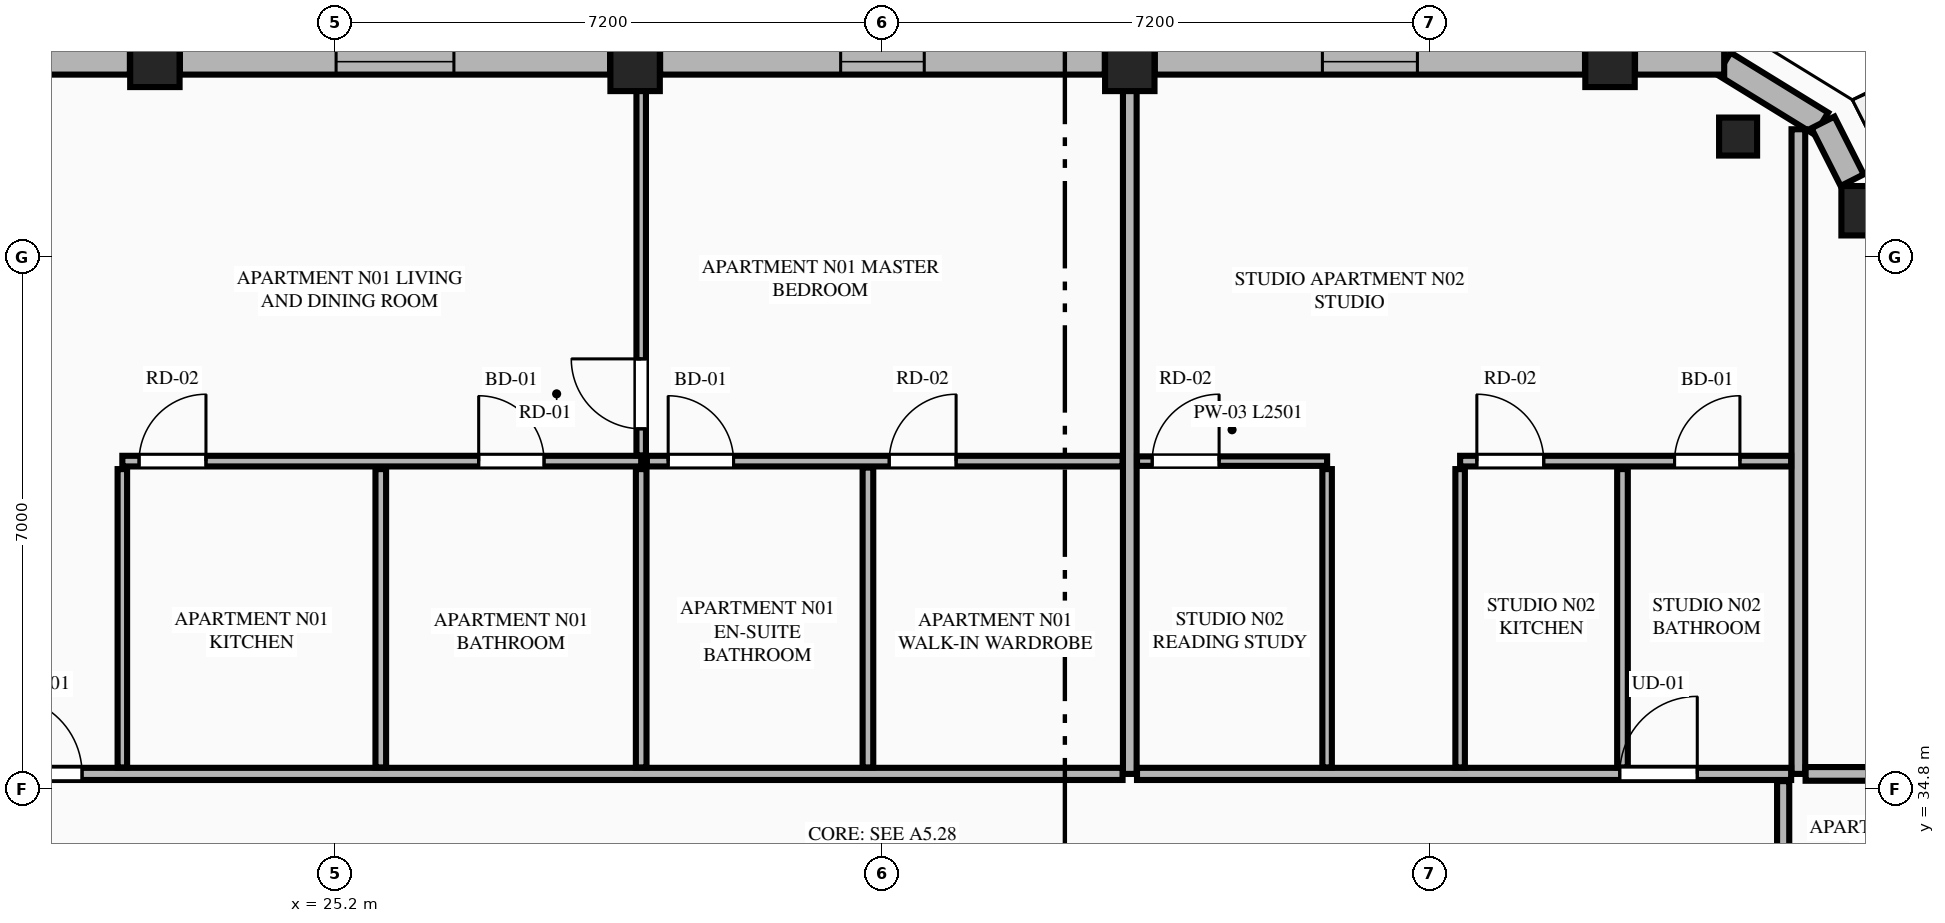
"""IFC4 building model, lengths in metres.
Left out: names, types, materials, properties, quantities, classifications, styles, units other than length and angle.
Written with IfcOpenShell. Run it as: python <this file> out.ifc"""

import sys

from ifc_helpers import new_model, si_unit, direction, frame, frame_2d, origin, origin_2d, place, context, subcontext, project, spatial, rectangle, extrude, element, fill, save


model = new_model("IFC4")
c1 = context("Model", 3, precision=1e-05, world=origin(), true_north=direction((0.0, 1.0)))
c2 = subcontext(c1, "Body", "Model", "MODEL_VIEW")
j1 = project(units=[si_unit("LENGTHUNIT", "METRE"), si_unit("PLANEANGLEUNIT", "RADIAN")], contexts=[c1])
p1 = place(None, origin())
s1 = spatial("IfcSite", under=j1, at=p1, CompositionType="ELEMENT")
p2 = place(p1, origin())
s2 = spatial("IfcBuilding", under=s1, at=p2, CompositionType="ELEMENT")
p3 = place(p2, frame((0.0, 0.0, 259.85)))
s3 = spatial("IfcBuildingStorey", under=s2, at=p3, CompositionType="ELEMENT", Elevation=259.85)
for number, where, z_axis, x_axis in (
    (1, (45.341, 42.409, 0.0), (0.0, 0.0, 1.0), (1.0, 0.0, 0.0)),
    (2, (41.972, 44.361, 0.0), (0.0, 0.0, 1.0), (1.0, 0.0, 0.0)),
    (3, (35.654, 44.308, 0.0), (0.0, 0.0, 1.0), (1.0, 0.0, 0.0)),
    (4, (29.146, 44.308, 0.0), (0.0, 0.0, 1.0), (1.0, 0.0, 0.0)),
    (5, (22.828, 44.361, 0.0), (0.0, 0.0, 1.0), (1.0, 0.0, 0.0)),
):
    element("IfcColumn", number, at=place(p3, frame(where, z_axis=z_axis, x_axis=x_axis)), inside=s3, PredefinedType="COLUMN", context=c2, shape_type="SweptSolid", body=[
        extrude(rectangle(XDim=0.65, YDim=0.65, at=origin_2d()), origin(), (0.0, 0.0, 1.0), 3.65),
    ])
p4 = place(p3, frame((43.657, 43.385, 0.0), z_axis=(0.0, 0.0, 1.0), x_axis=(-0.865256437757, 0.501329529272, 0.0)))
e6 = element("IfcColumn", 6, at=p4, inside=s3, PredefinedType="PILASTER", context=c2, shape_type="SweptSolid", body=[
    extrude(rectangle(XDim=0.5, YDim=0.35, at=origin_2d()), origin(), (0.0, 0.0, 1.0), 3.65),
])
p5 = place(p3, frame((44.753, 43.555, 0.0), z_axis=(0.0, 0.0, 1.0), x_axis=(-0.851680557619, 0.52406128246, 0.0)))
e7 = element("IfcWall", 7, at=p5, inside=s3, PredefinedType="STANDARD", context=c2, shape_type="SweptSolid", body=[
    extrude(rectangle(XDim=1.508, YDim=0.34, at=frame_2d((0.754, 0.0))), origin(), (0.0, 0.0, 1.0), 3.45),
])
p6 = place(p3, frame((45.158, 42.811, 0.0), z_axis=(0.0, 0.0, 1.0), x_axis=(-0.451907025977, 0.8920650424, 0.0)))
e8 = element("IfcWall", 8, at=p6, inside=s3, PredefinedType="STANDARD", context=c2, shape_type="SweptSolid", body=[
    extrude(rectangle(XDim=0.852, YDim=0.34, at=frame_2d((0.426, 0.0))), origin(), (0.0, 0.0, 1.0), 3.45),
])
p7 = place(p3, frame((43.474, 44.37, 0.0), z_axis=(0.0, 0.0, 1.0), x_axis=(-1.0, 0.0, 0.0)))
e9 = element("IfcWall", 9, at=p7, inside=s3, PredefinedType="STANDARD", context=c2, shape_type="SweptSolid", body=[
    extrude(rectangle(XDim=1.173, YDim=0.34, at=frame_2d((0.586, 0.0))), origin(), (0.0, 0.0, 1.0), 3.45),
])
p8 = place(p3, frame((41.643, 44.37, 0.0), z_axis=(0.0, 0.0, 1.0), x_axis=(-1.0, 0.0, 0.0)))
e10 = element("IfcWall", 10, at=p8, inside=s3, PredefinedType="STANDARD", context=c2, shape_type="SweptSolid", body=[
    extrude(rectangle(XDim=5.66, YDim=0.34, at=frame_2d((2.83, 0.0))), origin(), (0.0, 0.0, 1.0), 2.983),
])
p9 = place(p8, frame((2.205, 0.0, 0.75)))
e11 = element("IfcOpeningElement", 11, at=p9, cuts=e10, PredefinedType="OPENING", context=c2, shape_type="SweptSolid", body=[
    extrude(rectangle(XDim=1.25, YDim=1.95, at=frame_2d((0.625, 0.975))), frame((0.0, 0.18, 0.0), z_axis=(0.0, -1.0, 0.0), x_axis=(1.0, 0.0, 0.0)), (0.0, 0.0, 1.0), 0.36),
])
p10 = place(p3, frame((35.325, 44.37, 0.0), z_axis=(0.0, 0.0, 1.0), x_axis=(-1.0, 0.0, 0.0)))
e12 = element("IfcWall", 12, at=p10, inside=s3, PredefinedType="STANDARD", context=c2, shape_type="SweptSolid", body=[
    extrude(rectangle(XDim=5.85, YDim=0.34, at=frame_2d((2.925, 0.0))), origin(), (0.0, 0.0, 1.0), 2.983),
])
p11 = place(p10, frame((2.375, 0.0, 0.75)))
e13 = element("IfcOpeningElement", 13, at=p11, cuts=e12, PredefinedType="OPENING", context=c2, shape_type="SweptSolid", body=[
    extrude(rectangle(XDim=1.1, YDim=2.0, at=frame_2d((0.55, 1.0))), frame((0.0, 0.18, 0.0), z_axis=(0.0, -1.0, 0.0), x_axis=(1.0, 0.0, 0.0)), (0.0, 0.0, 1.0), 0.36),
])
p12 = place(p3, frame((28.817, 44.37, 0.0), z_axis=(0.0, 0.0, 1.0), x_axis=(-1.0, 0.0, 0.0)))
e14 = element("IfcWall", 14, at=p12, inside=s3, PredefinedType="STANDARD", context=c2, shape_type="SweptSolid", body=[
    extrude(rectangle(XDim=5.66, YDim=0.34, at=frame_2d((2.83, 0.0))), origin(), (0.0, 0.0, 1.0), 2.983),
])
p13 = place(p12, frame((2.055, 0.0, 0.75)))
e15 = element("IfcOpeningElement", 15, at=p13, cuts=e14, PredefinedType="OPENING", context=c2, shape_type="SweptSolid", body=[
    extrude(rectangle(XDim=1.55, YDim=2.05, at=frame_2d((0.775, 1.025))), frame((0.0, 0.18, 0.0), z_axis=(0.0, -1.0, 0.0), x_axis=(1.0, 0.0, 0.0)), (0.0, 0.0, 1.0), 0.36),
])
p14 = place(p3, frame((22.499, 44.37, 0.0), z_axis=(0.0, 0.0, 1.0), x_axis=(-1.0, 0.0, 0.0)))
e16 = element("IfcWall", 16, at=p14, inside=s3, PredefinedType="STANDARD", context=c2, shape_type="SweptSolid", body=[
    extrude(rectangle(XDim=1.173, YDim=0.34, at=frame_2d((0.586, 0.0))), origin(), (0.0, 0.0, 1.0), 3.45),
])
p15 = place(p3, frame((35.654, 35.0, 0.0), z_axis=(0.0, 0.0, 1.0), x_axis=(0.0, 1.0, 0.0)))
e17 = element("IfcWall", 17, at=p15, inside=s3, PredefinedType="PARTITIONING", context=c2, shape_type="SweptSolid", body=[
    extrude(rectangle(XDim=9.195, YDim=0.18, at=frame_2d((4.598, 0.0))), origin(), (0.0, 0.0, 1.0), 2.907),
])
p16 = place(p3, frame((44.45, 35.0, 0.0), z_axis=(0.0, 0.0, 1.0), x_axis=(0.0, 1.0, 0.0)))
e18 = element("IfcWall", 18, at=p16, inside=s3, PredefinedType="PARTITIONING", context=c2, shape_type="SweptSolid", body=[
    extrude(rectangle(XDim=8.481, YDim=0.18, at=frame_2d((4.24, 0.0))), origin(), (0.0, 0.0, 1.0), 3.45),
])
p17 = place(p3, frame((20.445, 35.0, 0.0), z_axis=(0.0, 0.0, 1.0), x_axis=(1.0, 0.0, 0.0)))
e19 = element("IfcWall", 19, at=p17, inside=s3, PredefinedType="PARTITIONING", context=c2, shape_type="SweptSolid", body=[
    extrude(rectangle(XDim=15.114, YDim=0.16, at=frame_2d((7.557, 0.0))), origin(), (0.0, 0.0, 1.0), 3.45),
])
p18 = place(p17, frame((0.405, 0.0, 0.0)))
e20 = element("IfcOpeningElement", 20, at=p18, cuts=e19, PredefinedType="OPENING", context=c2, shape_type="SweptSolid", body=[
    extrude(rectangle(XDim=1.02, YDim=2.25, at=frame_2d((0.51, 1.125))), frame((0.0, 0.09, 0.0), z_axis=(0.0, -1.0, 0.0), x_axis=(1.0, 0.0, 0.0)), (0.0, 0.0, 1.0), 0.18),
])
p19 = place(p3, frame((22.4, 35.085, 0.0), z_axis=(0.0, 0.0, 1.0), x_axis=(0.0, 1.0, 0.0)))
e21 = element("IfcWall", 21, at=p19, inside=s3, PredefinedType="PARTITIONING", context=c2, shape_type="SweptSolid", body=[
    extrude(rectangle(XDim=3.925, YDim=0.125, at=frame_2d((1.962, 0.0))), origin(), (0.0, 0.0, 1.0), 3.45),
])
p20 = place(p3, frame((22.4, 39.115, 0.0), z_axis=(0.0, 0.0, 1.0), x_axis=(1.0, 0.0, 0.0)))
e22 = element("IfcWall", 22, at=p20, inside=s3, PredefinedType="PLUMBINGWALL", context=c2, shape_type="SweptSolid", body=[
    extrude(rectangle(XDim=6.826, YDim=0.14, at=frame_2d((3.413, 0.0))), origin(), (0.0, 0.0, 1.0), 3.45),
])
p21 = place(p20, frame((4.688, 0.0, 0.0)))
e23 = element("IfcOpeningElement", 23, at=p21, cuts=e22, PredefinedType="OPENING", context=c2, shape_type="SweptSolid", body=[
    extrude(rectangle(XDim=0.86, YDim=2.1, at=frame_2d((0.43, 1.05))), frame((0.0, 0.08, 0.0), z_axis=(0.0, -1.0, 0.0), x_axis=(1.0, 0.0, 0.0)), (0.0, 0.0, 1.0), 0.16),
])
p22 = place(p20, frame((0.22, 0.0, 0.0)))
e24 = element("IfcOpeningElement", 24, at=p22, cuts=e22, PredefinedType="OPENING", context=c2, shape_type="SweptSolid", body=[
    extrude(rectangle(XDim=0.88, YDim=2.15, at=frame_2d((0.44, 1.075))), frame((0.0, 0.08, 0.0), z_axis=(0.0, -1.0, 0.0), x_axis=(1.0, 0.0, 0.0)), (0.0, 0.0, 1.0), 0.16),
])
p23 = place(p3, frame((29.301, 39.115, 0.0), z_axis=(0.0, 0.0, 1.0), x_axis=(1.0, 0.0, 0.0)))
e25 = element("IfcWall", 25, at=p23, inside=s3, PredefinedType="PLUMBINGWALL", context=c2, shape_type="SweptSolid", body=[
    extrude(rectangle(XDim=6.258, YDim=0.14, at=frame_2d((3.129, 0.0))), origin(), (0.0, 0.0, 1.0), 3.45),
])
p24 = place(p23, frame((0.28, 0.0, 0.0)))
e26 = element("IfcOpeningElement", 26, at=p24, cuts=e25, PredefinedType="OPENING", context=c2, shape_type="SweptSolid", body=[
    extrude(rectangle(XDim=0.86, YDim=2.1, at=frame_2d((0.43, 1.05))), frame((0.0, 0.08, 0.0), z_axis=(0.0, -1.0, 0.0), x_axis=(1.0, 0.0, 0.0)), (0.0, 0.0, 1.0), 0.16),
])
p25 = place(p23, frame((3.188, 0.0, 0.0)))
e27 = element("IfcOpeningElement", 27, at=p25, cuts=e25, PredefinedType="OPENING", context=c2, shape_type="SweptSolid", body=[
    extrude(rectangle(XDim=0.88, YDim=2.15, at=frame_2d((0.44, 1.075))), frame((0.0, 0.08, 0.0), z_axis=(0.0, -1.0, 0.0), x_axis=(1.0, 0.0, 0.0)), (0.0, 0.0, 1.0), 0.16),
])
p26 = place(p3, frame((25.8, 35.085, 0.0), z_axis=(0.0, 0.0, 1.0), x_axis=(0.0, 1.0, 0.0)))
e28 = element("IfcWall", 28, at=p26, inside=s3, PredefinedType="PLUMBINGWALL", context=c2, shape_type="SweptSolid", body=[
    extrude(rectangle(XDim=3.925, YDim=0.14, at=frame_2d((1.962, 0.0))), origin(), (0.0, 0.0, 1.0), 3.45),
])
p27 = place(p3, frame((29.226, 35.085, 0.0), z_axis=(0.0, 0.0, 1.0), x_axis=(0.0, 1.0, 0.0)))
e29 = element("IfcWall", 29, at=p27, inside=s3, PredefinedType="PLUMBINGWALL", context=c2, shape_type="SweptSolid", body=[
    extrude(rectangle(XDim=3.925, YDim=0.14, at=frame_2d((1.962, 0.0))), origin(), (0.0, 0.0, 1.0), 2.907),
])
p28 = place(p3, frame((29.226, 39.19, 0.0), z_axis=(0.0, 0.0, 1.0), x_axis=(0.0, 1.0, 0.0)))
e30 = element("IfcWall", 30, at=p28, inside=s3, PredefinedType="PARTITIONING", context=c2, shape_type="SweptSolid", body=[
    extrude(rectangle(XDim=5.095, YDim=0.125, at=frame_2d((2.547, 0.0))), origin(), (0.0, 0.0, 1.0), 2.907),
])
p29 = place(p28, frame((0.35, 0.0, 0.0)))
e31 = element("IfcOpeningElement", 31, at=p29, cuts=e30, PredefinedType="OPENING", context=c2, shape_type="SweptSolid", body=[
    extrude(rectangle(XDim=0.92, YDim=2.15, at=frame_2d((0.46, 1.075))), frame((0.0, 0.073, 0.0), z_axis=(0.0, -1.0, 0.0), x_axis=(1.0, 0.0, 0.0)), (0.0, 0.0, 1.0), 0.145),
])
p30 = place(p3, frame((32.209, 35.085, 0.0), z_axis=(0.0, 0.0, 1.0), x_axis=(0.0, 1.0, 0.0)))
e32 = element("IfcWall", 32, at=p30, inside=s3, PredefinedType="PLUMBINGWALL", context=c2, shape_type="SweptSolid", body=[
    extrude(rectangle(XDim=3.945, YDim=0.14, at=frame_2d((1.973, 0.0))), origin(), (0.0, 0.0, 1.0), 3.45),
])
p31 = place(p3, frame((35.749, 35.0, 0.0), z_axis=(0.0, 0.0, 1.0), x_axis=(1.0, 0.0, 0.0)))
e33 = element("IfcWall", 33, at=p31, inside=s3, PredefinedType="PARTITIONING", context=c2, shape_type="SweptSolid", body=[
    extrude(rectangle(XDim=8.606, YDim=0.16, at=frame_2d((4.303, 0.0))), origin(), (0.0, 0.0, 1.0), 3.45),
])
p32 = place(p31, frame((6.351, 0.0, 0.0)))
e34 = element("IfcOpeningElement", 34, at=p32, cuts=e33, PredefinedType="OPENING", context=c2, shape_type="SweptSolid", body=[
    extrude(rectangle(XDim=1.02, YDim=2.25, at=frame_2d((0.51, 1.125))), frame((0.0, 0.09, 0.0), z_axis=(0.0, -1.0, 0.0), x_axis=(1.0, 0.0, 0.0)), (0.0, 0.0, 1.0), 0.18),
])
p33 = place(p3, frame((40.0, 35.085, 0.0), z_axis=(0.0, 0.0, 1.0), x_axis=(0.0, 1.0, 0.0)))
e35 = element("IfcWall", 35, at=p33, inside=s3, PredefinedType="PARTITIONING", context=c2, shape_type="SweptSolid", body=[
    extrude(rectangle(XDim=3.925, YDim=0.125, at=frame_2d((1.962, 0.0))), origin(), (0.0, 0.0, 1.0), 3.45),
])
p34 = place(p3, frame((40.0, 39.115, 0.0), z_axis=(0.0, 0.0, 1.0), x_axis=(1.0, 0.0, 0.0)))
e36 = element("IfcWall", 36, at=p34, inside=s3, PredefinedType="PLUMBINGWALL", context=c2, shape_type="SweptSolid", body=[
    extrude(rectangle(XDim=4.355, YDim=0.14, at=frame_2d((2.177, 0.0))), origin(), (0.0, 0.0, 1.0), 3.45),
])
p35 = place(p34, frame((2.821, 0.0, 0.0)))
e37 = element("IfcOpeningElement", 37, at=p35, cuts=e36, PredefinedType="OPENING", context=c2, shape_type="SweptSolid", body=[
    extrude(rectangle(XDim=0.86, YDim=2.1, at=frame_2d((0.43, 1.05))), frame((0.0, 0.08, 0.0), z_axis=(0.0, -1.0, 0.0), x_axis=(1.0, 0.0, 0.0)), (0.0, 0.0, 1.0), 0.16),
])
p36 = place(p34, frame((0.22, 0.0, 0.0)))
e38 = element("IfcOpeningElement", 38, at=p36, cuts=e36, PredefinedType="OPENING", context=c2, shape_type="SweptSolid", body=[
    extrude(rectangle(XDim=0.88, YDim=2.15, at=frame_2d((0.44, 1.075))), frame((0.0, 0.08, 0.0), z_axis=(0.0, -1.0, 0.0), x_axis=(1.0, 0.0, 0.0)), (0.0, 0.0, 1.0), 0.16),
])
p37 = place(p3, frame((42.136, 35.085, 0.0), z_axis=(0.0, 0.0, 1.0), x_axis=(0.0, 1.0, 0.0)))
e39 = element("IfcWall", 39, at=p37, inside=s3, PredefinedType="PLUMBINGWALL", context=c2, shape_type="SweptSolid", body=[
    extrude(rectangle(XDim=3.925, YDim=0.14, at=frame_2d((1.962, 0.0))), origin(), (0.0, 0.0, 1.0), 3.45),
])
p38 = place(p3, frame((38.25, 35.085, 0.0), z_axis=(0.0, 0.0, 1.0), x_axis=(0.0, 1.0, 0.0)))
e40 = element("IfcWall", 40, at=p38, inside=s3, PredefinedType="PARTITIONING", context=c2, shape_type="SweptSolid", body=[
    extrude(rectangle(XDim=3.925, YDim=0.125, at=frame_2d((1.962, 0.0))), origin(), (0.0, 0.0, 1.0), 3.45),
])
p39 = place(p3, frame((35.749, 39.115, 0.0), z_axis=(0.0, 0.0, 1.0), x_axis=(1.0, 0.0, 0.0)))
e41 = element("IfcWall", 41, at=p39, inside=s3, PredefinedType="PARTITIONING", context=c2, shape_type="SweptSolid", body=[
    extrude(rectangle(XDim=2.501, YDim=0.125, at=frame_2d((1.25, 0.0))), origin(), (0.0, 0.0, 1.0), 3.45),
])
p40 = place(p39, frame((0.2, 0.0, 0.0)))
e42 = element("IfcOpeningElement", 42, at=p40, cuts=e41, PredefinedType="OPENING", context=c2, shape_type="SweptSolid", body=[
    extrude(rectangle(XDim=0.88, YDim=2.15, at=frame_2d((0.44, 1.075))), frame((0.0, 0.073, 0.0), z_axis=(0.0, -1.0, 0.0), x_axis=(1.0, 0.0, 0.0)), (0.0, 0.0, 1.0), 0.145),
])
p41 = place(p3, frame((44.545, 35.0, 0.0), z_axis=(0.0, 0.0, 1.0), x_axis=(1.0, 0.0, 0.0)))
e43 = element("IfcWall", 43, at=p41, inside=s3, PredefinedType="PARTITIONING", context=c2, shape_type="SweptSolid", body=[
    extrude(rectangle(XDim=4.322, YDim=0.18, at=frame_2d((2.161, 0.0))), origin(), (0.0, 0.0, 1.0), 3.45),
])
p42 = place(p3, frame((44.25, 26.539, 0.0), z_axis=(0.0, 0.0, 1.0), x_axis=(0.0, 1.0, 0.0)))
e44 = element("IfcWall", 44, at=p42, inside=s3, PredefinedType="PARTITIONING", context=c2, shape_type="SweptSolid", body=[
    extrude(rectangle(XDim=8.366, YDim=0.16, at=frame_2d((4.183, 0.0))), origin(), (0.0, 0.0, 1.0), 3.137),
])
p43 = place(p42, frame((0.45, 0.0, 0.0)))
e45 = element("IfcOpeningElement", 45, at=p43, cuts=e44, PredefinedType="OPENING", context=c2, shape_type="SweptSolid", body=[
    extrude(rectangle(XDim=1.02, YDim=2.25, at=frame_2d((0.51, 1.125))), frame((0.0, 0.09, 0.0), z_axis=(0.0, -1.0, 0.0), x_axis=(1.0, 0.0, 0.0)), (0.0, 0.0, 1.0), 0.18),
])
p44 = place(p9, origin())
e46 = element("IfcWindow", 46, at=p44, inside=s3, PartitioningType="SINGLE_PANEL", PredefinedType="WINDOW", context=c2, shape_type="SweptSolid", body=[
    extrude(rectangle(XDim=1.25, YDim=1.95, at=frame_2d((0.625, 0.975))), frame((0.0, 0.03, 0.0), z_axis=(0.0, -1.0, 0.0), x_axis=(1.0, 0.0, 0.0)), (0.0, 0.0, 1.0), 0.06),
])
fill(e11, e46)
p45 = place(p11, origin())
e47 = element("IfcWindow", 47, at=p45, inside=s3, PartitioningType="SINGLE_PANEL", PredefinedType="WINDOW", context=c2, shape_type="SweptSolid", body=[
    extrude(rectangle(XDim=1.1, YDim=2.0, at=frame_2d((0.55, 1.0))), frame((0.0, 0.03, 0.0), z_axis=(0.0, -1.0, 0.0), x_axis=(1.0, 0.0, 0.0)), (0.0, 0.0, 1.0), 0.06),
])
fill(e13, e47)
p46 = place(p13, origin())
e48 = element("IfcWindow", 48, at=p46, inside=s3, PartitioningType="SINGLE_PANEL", PredefinedType="WINDOW", context=c2, shape_type="SweptSolid", body=[
    extrude(rectangle(XDim=1.55, YDim=2.05, at=frame_2d((0.775, 1.025))), frame((0.0, 0.03, 0.0), z_axis=(0.0, -1.0, 0.0), x_axis=(1.0, 0.0, 0.0)), (0.0, 0.0, 1.0), 0.06),
])
fill(e15, e48)
p47 = place(p21, origin())
e49 = element("IfcDoor", 49, at=p47, inside=s3, OperationType="SINGLE_SWING_LEFT", PredefinedType="DOOR", context=c2, shape_type="SweptSolid", body=[
    extrude(rectangle(XDim=0.86, YDim=2.1, at=frame_2d((0.43, 1.05))), frame((0.0, 0.025, 0.0), z_axis=(0.0, -1.0, 0.0), x_axis=(1.0, 0.0, 0.0)), (0.0, 0.0, 1.0), 0.05),
])
fill(e23, e49)
p48 = place(p24, origin())
e50 = element("IfcDoor", 50, at=p48, inside=s3, OperationType="SINGLE_SWING_LEFT", PredefinedType="DOOR", context=c2, shape_type="SweptSolid", body=[
    extrude(rectangle(XDim=0.86, YDim=2.1, at=frame_2d((0.43, 1.05))), frame((0.0, 0.025, 0.0), z_axis=(0.0, -1.0, 0.0), x_axis=(1.0, 0.0, 0.0)), (0.0, 0.0, 1.0), 0.05),
])
fill(e26, e50)
p49 = place(p25, origin())
e51 = element("IfcDoor", 51, at=p49, inside=s3, OperationType="SINGLE_SWING_RIGHT", PredefinedType="DOOR", context=c2, shape_type="SweptSolid", body=[
    extrude(rectangle(XDim=0.88, YDim=2.15, at=frame_2d((0.44, 1.075))), frame((0.0, 0.025, 0.0), z_axis=(0.0, -1.0, 0.0), x_axis=(1.0, 0.0, 0.0)), (0.0, 0.0, 1.0), 0.05),
])
fill(e27, e51)
p50 = place(p18, origin())
e52 = element("IfcDoor", 52, at=p50, inside=s3, OperationType="SINGLE_SWING_LEFT", PredefinedType="DOOR", context=c2, shape_type="SweptSolid", body=[
    extrude(rectangle(XDim=1.02, YDim=2.25, at=frame_2d((0.51, 1.125))), frame((0.0, 0.025, 0.0), z_axis=(0.0, -1.0, 0.0), x_axis=(1.0, 0.0, 0.0)), (0.0, 0.0, 1.0), 0.05),
])
fill(e20, e52)
p51 = place(p22, origin())
e53 = element("IfcDoor", 53, at=p51, inside=s3, OperationType="SINGLE_SWING_RIGHT", PredefinedType="DOOR", context=c2, shape_type="SweptSolid", body=[
    extrude(rectangle(XDim=0.88, YDim=2.15, at=frame_2d((0.44, 1.075))), frame((0.0, 0.025, 0.0), z_axis=(0.0, -1.0, 0.0), x_axis=(1.0, 0.0, 0.0)), (0.0, 0.0, 1.0), 0.05),
])
fill(e24, e53)
p52 = place(p29, origin())
e54 = element("IfcDoor", 54, at=p52, inside=s3, OperationType="SINGLE_SWING_RIGHT", PredefinedType="DOOR", context=c2, shape_type="SweptSolid", body=[
    extrude(rectangle(XDim=0.92, YDim=2.15, at=frame_2d((0.46, 1.075))), frame((0.0, 0.025, 0.0), z_axis=(0.0, -1.0, 0.0), x_axis=(1.0, 0.0, 0.0)), (0.0, 0.0, 1.0), 0.05),
])
fill(e31, e54)
p53 = place(p40, origin())
e55 = element("IfcDoor", 55, at=p53, inside=s3, OperationType="SINGLE_SWING_RIGHT", PredefinedType="DOOR", context=c2, shape_type="SweptSolid", body=[
    extrude(rectangle(XDim=0.88, YDim=2.15, at=frame_2d((0.44, 1.075))), frame((0.0, 0.025, 0.0), z_axis=(0.0, -1.0, 0.0), x_axis=(1.0, 0.0, 0.0)), (0.0, 0.0, 1.0), 0.05),
])
fill(e42, e55)
p54 = place(p35, origin())
e56 = element("IfcDoor", 56, at=p54, inside=s3, OperationType="SINGLE_SWING_RIGHT", PredefinedType="DOOR", context=c2, shape_type="SweptSolid", body=[
    extrude(rectangle(XDim=0.86, YDim=2.1, at=frame_2d((0.43, 1.05))), frame((0.0, 0.025, 0.0), z_axis=(0.0, -1.0, 0.0), x_axis=(1.0, 0.0, 0.0)), (0.0, 0.0, 1.0), 0.05),
])
fill(e37, e56)
p55 = place(p32, origin())
e57 = element("IfcDoor", 57, at=p55, inside=s3, OperationType="SINGLE_SWING_RIGHT", PredefinedType="DOOR", context=c2, shape_type="SweptSolid", body=[
    extrude(rectangle(XDim=1.02, YDim=2.25, at=frame_2d((0.51, 1.125))), frame((0.0, 0.025, 0.0), z_axis=(0.0, -1.0, 0.0), x_axis=(1.0, 0.0, 0.0)), (0.0, 0.0, 1.0), 0.05),
])
fill(e34, e57)
p56 = place(p36, origin())
e58 = element("IfcDoor", 58, at=p56, inside=s3, OperationType="SINGLE_SWING_LEFT", PredefinedType="DOOR", context=c2, shape_type="SweptSolid", body=[
    extrude(rectangle(XDim=0.88, YDim=2.15, at=frame_2d((0.44, 1.075))), frame((0.0, 0.025, 0.0), z_axis=(0.0, -1.0, 0.0), x_axis=(1.0, 0.0, 0.0)), (0.0, 0.0, 1.0), 0.05),
])
fill(e38, e58)
save(model, sys.argv[1])
